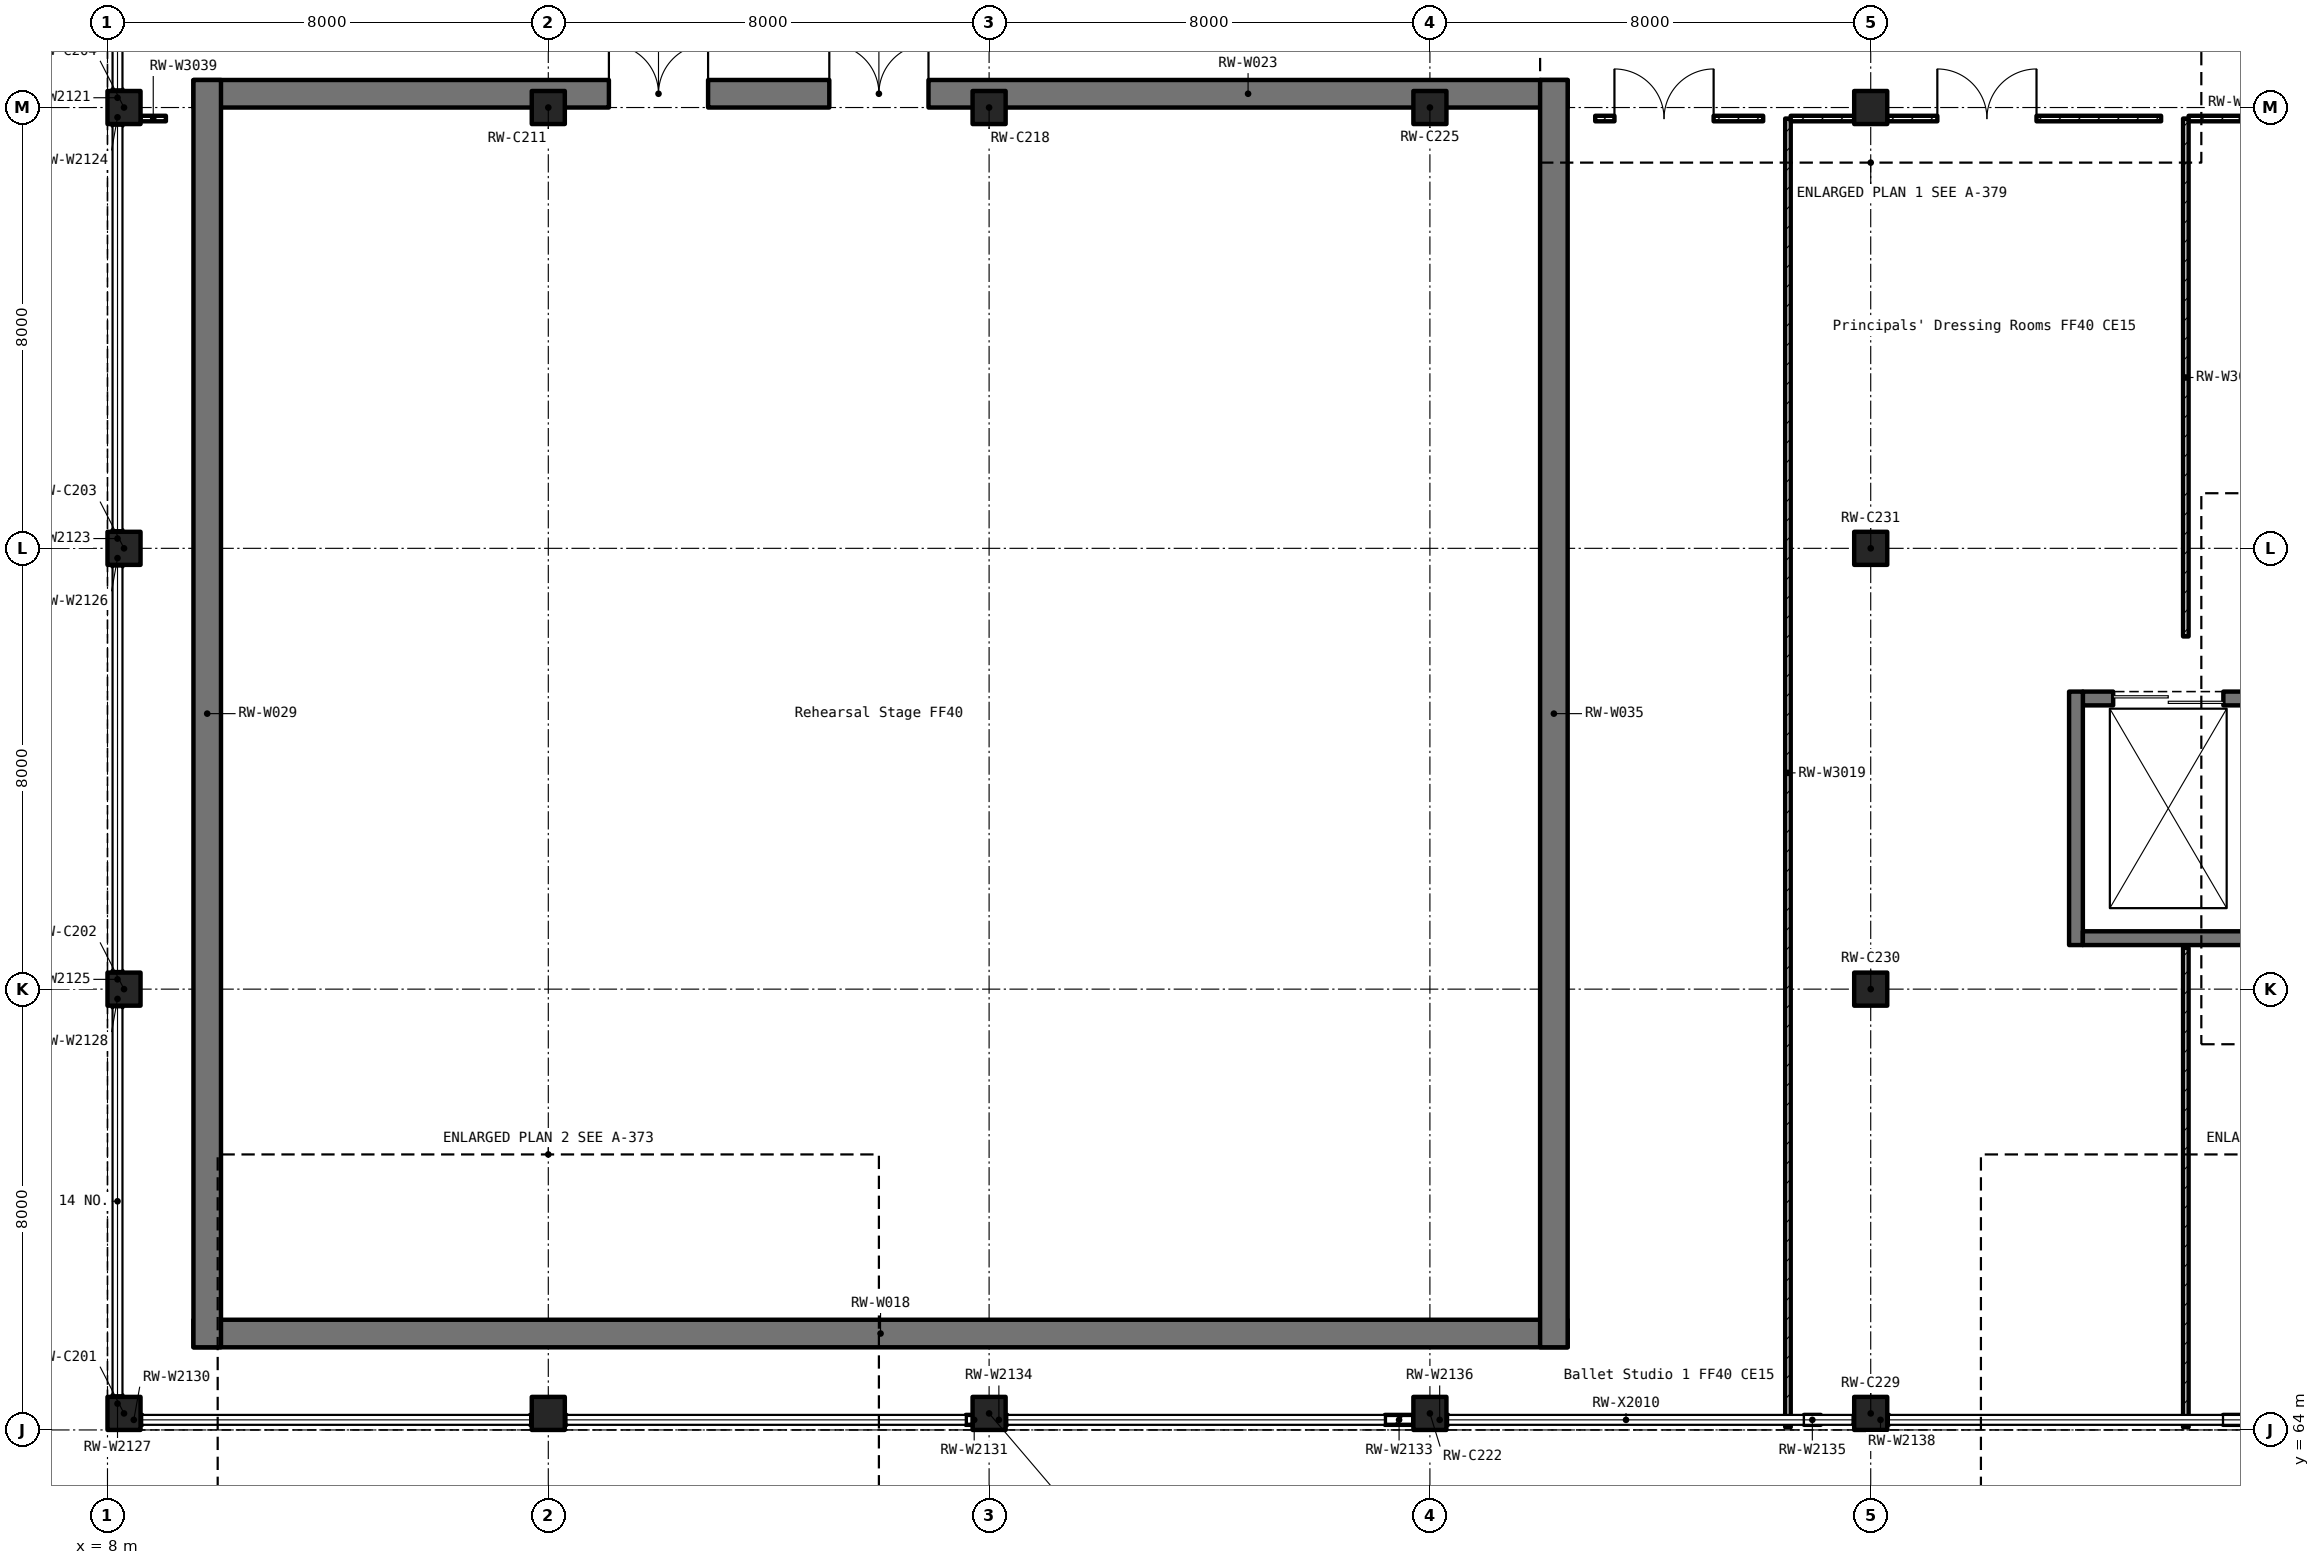
"""IFC4 building model, lengths in metres.
Left out: names, types, materials, properties, quantities, classifications, styles, units other than length and angle.
Written with IfcOpenShell. Run it as: python <this file> out.ifc"""

import sys

from ifc_helpers import new_model, si_unit, direction, frame, frame_2d, origin, origin_2d, place, context, subcontext, project, spatial, rectangle, extrude, element, fill, save


model = new_model("IFC4")
c1 = context("Model", 3, precision=1e-05, world=origin(), true_north=direction((0.0, 1.0)))
c2 = subcontext(c1, "Body", "Model", "MODEL_VIEW")
j1 = project(units=[si_unit("LENGTHUNIT", "METRE"), si_unit("PLANEANGLEUNIT", "RADIAN")], contexts=[c1])
p1 = place(None, origin())
s1 = spatial("IfcSite", under=j1, at=p1, CompositionType="ELEMENT")
p2 = place(p1, origin())
s2 = spatial("IfcBuilding", under=s1, at=p2, CompositionType="ELEMENT")
p3 = place(p2, origin())
s3 = spatial("IfcBuildingStorey", under=s2, at=p3, CompositionType="ELEMENT", Elevation=0.0)
for number, where, z_axis, x_axis in (
    (1, (8.3, 64.3, 0.0), (0.0, 0.0, 1.0), (1.0, 0.0, 0.0)),
    (2, (8.3, 72.0, 0.0), (0.0, 0.0, 1.0), (1.0, 0.0, 0.0)),
    (3, (8.3, 80.0, 0.0), (0.0, 0.0, 1.0), (1.0, 0.0, 0.0)),
    (4, (8.3, 88.0, 0.0), (0.0, 0.0, 1.0), (1.0, 0.0, 0.0)),
    (5, (16.0, 64.3, 0.0), (0.0, 0.0, 1.0), (1.0, 0.0, 0.0)),
    (6, (16.0, 88.0, 0.0), (0.0, 0.0, 1.0), (1.0, 0.0, 0.0)),
    (7, (24.0, 64.3, 0.0), (0.0, 0.0, 1.0), (1.0, 0.0, 0.0)),
    (8, (24.0, 88.0, 0.0), (0.0, 0.0, 1.0), (1.0, 0.0, 0.0)),
    (9, (32.0, 64.3, 0.0), (0.0, 0.0, 1.0), (1.0, 0.0, 0.0)),
    (10, (32.0, 88.0, 0.0), (0.0, 0.0, 1.0), (1.0, 0.0, 0.0)),
    (11, (40.0, 64.3, 0.0), (0.0, 0.0, 1.0), (1.0, 0.0, 0.0)),
    (12, (40.0, 72.0, 0.0), (0.0, 0.0, 1.0), (1.0, 0.0, 0.0)),
    (13, (40.0, 80.0, 0.0), (0.0, 0.0, 1.0), (1.0, 0.0, 0.0)),
    (14, (40.0, 88.0, 0.0), (0.0, 0.0, 1.0), (1.0, 0.0, 0.0)),
):
    element("IfcColumn", number, at=place(p3, frame(where, z_axis=z_axis, x_axis=x_axis)), inside=s3, PredefinedType="COLUMN", context=c2, shape_type="SweptSolid", body=[
        extrude(rectangle(XDim=0.6, YDim=0.6, at=origin_2d()), origin(), (0.0, 0.0, 1.0), 6.0),
    ])
p4 = place(p3, frame((9.56, 65.75, 0.0), z_axis=(0.0, 0.0, 1.0), x_axis=(1.0, 0.0, 0.0)))
e15 = element("IfcWall", 15, at=p4, inside=s3, PredefinedType="SHEAR", context=c2, shape_type="SweptSolid", body=[
    extrude(rectangle(XDim=24.94, YDim=0.5, at=frame_2d((12.47, 0.0))), origin(), (0.0, 0.0, 1.0), 6.0),
])
p5 = place(p3, frame((9.56, 88.25, 0.0), z_axis=(0.0, 0.0, 1.0), x_axis=(1.0, 0.0, 0.0)))
e16 = element("IfcWall", 16, at=p5, inside=s3, PredefinedType="SHEAR", context=c2, shape_type="SweptSolid", body=[
    extrude(rectangle(XDim=24.94, YDim=0.5, at=frame_2d((12.47, 0.0))), origin(), (0.0, 0.0, 1.0), 6.0),
])
p6 = place(p5, frame((11.54, 0.0, 0.0)))
e17 = element("IfcOpeningElement", 17, at=p6, cuts=e16, PredefinedType="OPENING", context=c2, shape_type="SweptSolid", body=[
    extrude(rectangle(XDim=1.8, YDim=2.1, at=frame_2d((0.9, 1.05))), frame((0.0, 0.262, 0.0), z_axis=(0.0, -1.0, 0.0), x_axis=(1.0, 0.0, 0.0)), (0.0, 0.0, 1.0), 0.524),
])
p7 = place(p5, frame((7.54, 0.0, 0.0)))
e18 = element("IfcOpeningElement", 18, at=p7, cuts=e16, PredefinedType="OPENING", context=c2, shape_type="SweptSolid", body=[
    extrude(rectangle(XDim=1.8, YDim=2.1, at=frame_2d((0.9, 1.05))), frame((0.0, 0.262, 0.0), z_axis=(0.0, -1.0, 0.0), x_axis=(1.0, 0.0, 0.0)), (0.0, 0.0, 1.0), 0.524),
])
for number, where, z_axis, x_axis in (
    (19, (9.81, 65.5, 0.0), (0.0, 0.0, 1.0), (0.0, 1.0, 0.0)),
    (20, (34.25, 65.5, 0.0), (0.0, 0.0, 1.0), (0.0, 1.0, 0.0)),
):
    element("IfcWall", number, at=place(p3, frame(where, z_axis=z_axis, x_axis=x_axis)), inside=s3, PredefinedType="SHEAR", context=c2, shape_type="SweptSolid", body=[
        extrude(rectangle(XDim=23.0, YDim=0.5, at=frame_2d((11.5, 0.0))), origin(), (0.0, 0.0, 1.0), 6.0),
    ])
p8 = place(p3, frame((46.95, 77.275, 0.0), z_axis=(0.0, 0.0, 1.0), x_axis=(-1.0, 0.0, 0.0)))
e21 = element("IfcWall", 21, at=p8, inside=s3, PredefinedType="SOLIDWALL", context=c2, shape_type="SweptSolid", body=[
    extrude(rectangle(XDim=3.1, YDim=0.25, at=frame_2d((1.55, 0.0))), origin(), (0.0, 0.0, 1.0), 6.0),
])
p9 = place(p8, frame((0.55, 0.0, 0.0)))
e22 = element("IfcOpeningElement", 22, at=p9, cuts=e21, PredefinedType="OPENING", context=c2, shape_type="SweptSolid", body=[
    extrude(rectangle(XDim=2.0, YDim=2.2, at=frame_2d((1.0, 1.1))), frame((0.0, 0.137, 0.0), z_axis=(0.0, -1.0, 0.0), x_axis=(1.0, 0.0, 0.0)), (0.0, 0.0, 1.0), 0.274),
])
p10 = place(p3, frame((43.725, 77.4, 0.0), z_axis=(0.0, 0.0, 1.0), x_axis=(0.0, -1.0, 0.0)))
e23 = element("IfcWall", 23, at=p10, inside=s3, PredefinedType="SOLIDWALL", context=c2, shape_type="SweptSolid", body=[
    extrude(rectangle(XDim=4.6, YDim=0.25, at=frame_2d((2.3, 0.0))), origin(), (0.0, 0.0, 1.0), 6.0),
])
p11 = place(p3, frame((43.85, 72.925, 0.0), z_axis=(0.0, 0.0, 1.0), x_axis=(1.0, 0.0, 0.0)))
e24 = element("IfcWall", 24, at=p11, inside=s3, PredefinedType="SOLIDWALL", context=c2, shape_type="SweptSolid", body=[
    extrude(rectangle(XDim=3.1, YDim=0.25, at=frame_2d((1.55, 0.0))), origin(), (0.0, 0.0, 1.0), 6.0),
])
p12 = place(p3, frame((38.498, 87.8, 0.0), z_axis=(0.0, 0.0, 1.0), x_axis=(0.0, -1.0, 0.0)))
e25 = element("IfcWall", 25, at=p12, inside=s3, PredefinedType="PARTITIONING", context=c2, shape_type="SweptSolid", body=[
    extrude(rectangle(XDim=23.75, YDim=0.1, at=frame_2d((11.875, 0.0))), origin(), (0.0, 0.0, 1.0), 4.95),
])
p13 = place(p3, frame((45.719, 87.8, 0.0), z_axis=(0.0, 0.0, 1.0), x_axis=(0.0, -1.0, 0.0)))
e26 = element("IfcWall", 26, at=p13, inside=s3, PredefinedType="PARTITIONING", context=c2, shape_type="SweptSolid", body=[
    extrude(rectangle(XDim=9.399, YDim=0.1, at=frame_2d((4.7, 0.0))), origin(), (0.0, 0.0, 1.0), 4.95),
])
p14 = place(p3, frame((45.719, 72.75, 0.0), z_axis=(0.0, 0.0, 1.0), x_axis=(0.0, -1.0, 0.0)))
e27 = element("IfcWall", 27, at=p14, inside=s3, PredefinedType="PARTITIONING", context=c2, shape_type="SweptSolid", body=[
    extrude(rectangle(XDim=8.7, YDim=0.1, at=frame_2d((4.35, 0.0))), origin(), (0.0, 0.0, 1.0), 4.95),
])
p15 = place(p3, frame((45.77, 87.8, 0.0), z_axis=(0.0, 0.0, 1.0), x_axis=(1.0, 0.0, 0.0)))
e28 = element("IfcWall", 28, at=p15, inside=s3, PredefinedType="PARTITIONING", context=c2, shape_type="SweptSolid", body=[
    extrude(rectangle(XDim=1.93, YDim=0.1, at=frame_2d((0.965, 0.0))), origin(), (0.0, 0.0, 1.0), 4.95),
])
p16 = place(p3, frame((38.548, 87.8, 0.0), z_axis=(0.0, 0.0, 1.0), x_axis=(1.0, 0.0, 0.0)))
e29 = element("IfcWall", 29, at=p16, inside=s3, PredefinedType="PARTITIONING", context=c2, shape_type="SweptSolid", body=[
    extrude(rectangle(XDim=1.152, YDim=0.1, at=frame_2d((0.576, 0.0))), origin(), (0.0, 0.0, 1.0), 4.95),
])
p17 = place(p3, frame((40.3, 87.8, 0.0), z_axis=(0.0, 0.0, 1.0), x_axis=(1.0, 0.0, 0.0)))
e30 = element("IfcWall", 30, at=p17, inside=s3, PredefinedType="PARTITIONING", context=c2, shape_type="SweptSolid", body=[
    extrude(rectangle(XDim=4.97, YDim=0.1, at=frame_2d((2.485, 0.0))), origin(), (0.0, 0.0, 1.0), 4.95),
])
p18 = place(p17, frame((0.909, 0.0, 0.0)))
e31 = element("IfcOpeningElement", 31, at=p18, cuts=e30, PredefinedType="OPENING", context=c2, shape_type="SweptSolid", body=[
    extrude(rectangle(XDim=1.8, YDim=2.1, at=frame_2d((0.9, 1.05))), frame((0.0, 0.062, 0.0), z_axis=(0.0, -1.0, 0.0), x_axis=(1.0, 0.0, 0.0)), (0.0, 0.0, 1.0), 0.124),
])
p19 = place(p3, frame((35.0, 87.8, 0.0), z_axis=(0.0, 0.0, 1.0), x_axis=(1.0, 0.0, 0.0)))
e32 = element("IfcWall", 32, at=p19, inside=s3, PredefinedType="PARTITIONING", context=c2, shape_type="SweptSolid", body=[
    extrude(rectangle(XDim=3.048, YDim=0.1, at=frame_2d((1.524, 0.0))), origin(), (0.0, 0.0, 1.0), 4.95),
])
p20 = place(p19, frame((0.349, 0.0, 0.0)))
e33 = element("IfcOpeningElement", 33, at=p20, cuts=e32, PredefinedType="OPENING", context=c2, shape_type="SweptSolid", body=[
    extrude(rectangle(XDim=1.8, YDim=2.1, at=frame_2d((0.9, 1.05))), frame((0.0, 0.062, 0.0), z_axis=(0.0, -1.0, 0.0), x_axis=(1.0, 0.0, 0.0)), (0.0, 0.0, 1.0), 0.124),
])
p21 = place(p3, frame((8.601, 87.8, 0.0), z_axis=(0.0, 0.0, 1.0), x_axis=(1.0, 0.0, 0.0)))
e34 = element("IfcWall", 34, at=p21, inside=s3, PredefinedType="PARTITIONING", context=c2, shape_type="SweptSolid", body=[
    extrude(rectangle(XDim=0.459, YDim=0.1, at=frame_2d((0.229, 0.0))), origin(), (0.0, 0.0, 1.0), 4.95),
])
for number, where, z_axis, x_axis in (
    (35, (8.182, 88.33, 0.0), (0.0, 0.0, 1.0), (0.0, -1.0, 0.0)),
    (36, (8.182, 80.33, 0.0), (0.0, 0.0, 1.0), (0.0, -1.0, 0.0)),
    (37, (8.182, 87.67, 0.0), (0.0, 0.0, 1.0), (0.0, 1.0, 0.0)),
    (38, (8.182, 72.33, 0.0), (0.0, 0.0, 1.0), (0.0, -1.0, 0.0)),
    (39, (8.182, 79.67, 0.0), (0.0, 0.0, 1.0), (0.0, 1.0, 0.0)),
):
    element("IfcWall", number, at=place(p3, frame(where, z_axis=z_axis, x_axis=x_axis)), inside=s3, PredefinedType="SOLIDWALL", context=c2, shape_type="SweptSolid", body=[
        extrude(rectangle(XDim=0.305, YDim=0.18, at=frame_2d((0.153, 0.0))), origin(), (0.0, 0.0, 1.0), 4.2),
    ])
p22 = place(p3, frame((8.182, 64.63, 0.0), z_axis=(0.0, 0.0, 1.0), x_axis=(0.0, -1.0, 0.0)))
e40 = element("IfcWall", 40, at=p22, inside=s3, PredefinedType="SOLIDWALL", context=c2, shape_type="SweptSolid", body=[
    extrude(rectangle(XDim=0.305, YDim=0.18, at=frame_2d((0.152, 0.0))), origin(), (0.0, 0.0, 1.0), 4.2),
])
for number, where, z_axis, x_axis in (
    (41, (8.182, 71.67, 0.0), (0.0, 0.0, 1.0), (0.0, 1.0, 0.0)),
    (42, (15.67, 64.183, 0.0), (0.0, 0.0, 1.0), (1.0, 0.0, 0.0)),
):
    element("IfcWall", number, at=place(p3, frame(where, z_axis=z_axis, x_axis=x_axis)), inside=s3, PredefinedType="SOLIDWALL", context=c2, shape_type="SweptSolid", body=[
        extrude(rectangle(XDim=0.305, YDim=0.18, at=frame_2d((0.153, 0.0))), origin(), (0.0, 0.0, 1.0), 4.2),
    ])
p23 = place(p3, frame((8.63, 64.183, 0.0), z_axis=(0.0, 0.0, 1.0), x_axis=(-1.0, 0.0, 0.0)))
e43 = element("IfcWall", 43, at=p23, inside=s3, PredefinedType="SOLIDWALL", context=c2, shape_type="SweptSolid", body=[
    extrude(rectangle(XDim=0.305, YDim=0.18, at=frame_2d((0.152, 0.0))), origin(), (0.0, 0.0, 1.0), 4.2),
])
for number, where, z_axis, x_axis in (
    (44, (23.577, 64.183, 0.0), (0.0, 0.0, 1.0), (1.0, 0.0, 0.0)),
    (45, (16.33, 64.183, 0.0), (0.0, 0.0, 1.0), (-1.0, 0.0, 0.0)),
):
    element("IfcWall", number, at=place(p3, frame(where, z_axis=z_axis, x_axis=x_axis)), inside=s3, PredefinedType="SOLIDWALL", context=c2, shape_type="SweptSolid", body=[
        extrude(rectangle(XDim=0.305, YDim=0.18, at=frame_2d((0.153, 0.0))), origin(), (0.0, 0.0, 1.0), 4.2),
    ])
p24 = place(p3, frame((31.183, 64.183, 0.0), z_axis=(0.0, 0.0, 1.0), x_axis=(1.0, 0.0, 0.0)))
e46 = element("IfcWall", 46, at=p24, inside=s3, PredefinedType="SOLIDWALL", context=c2, shape_type="SweptSolid", body=[
    extrude(rectangle(XDim=0.515, YDim=0.18, at=frame_2d((0.257, 0.0))), origin(), (0.0, 0.0, 1.0), 4.2),
])
p25 = place(p3, frame((24.33, 64.183, 0.0), z_axis=(0.0, 0.0, 1.0), x_axis=(-1.0, 0.0, 0.0)))
e47 = element("IfcWall", 47, at=p25, inside=s3, PredefinedType="SOLIDWALL", context=c2, shape_type="SweptSolid", body=[
    extrude(rectangle(XDim=0.305, YDim=0.18, at=frame_2d((0.153, 0.0))), origin(), (0.0, 0.0, 1.0), 4.2),
])
p26 = place(p3, frame((38.788, 64.183, 0.0), z_axis=(0.0, 0.0, 1.0), x_axis=(1.0, 0.0, 0.0)))
e48 = element("IfcWall", 48, at=p26, inside=s3, PredefinedType="SOLIDWALL", context=c2, shape_type="SweptSolid", body=[
    extrude(rectangle(XDim=0.305, YDim=0.18, at=frame_2d((0.152, 0.0))), origin(), (0.0, 0.0, 1.0), 4.2),
])
p27 = place(p3, frame((32.33, 64.183, 0.0), z_axis=(0.0, 0.0, 1.0), x_axis=(-1.0, 0.0, 0.0)))
e49 = element("IfcWall", 49, at=p27, inside=s3, PredefinedType="SOLIDWALL", context=c2, shape_type="SweptSolid", body=[
    extrude(rectangle(XDim=0.305, YDim=0.18, at=frame_2d((0.153, 0.0))), origin(), (0.0, 0.0, 1.0), 4.2),
])
p28 = place(p3, frame((46.394, 64.183, 0.0), z_axis=(0.0, 0.0, 1.0), x_axis=(1.0, 0.0, 0.0)))
e50 = element("IfcWall", 50, at=p28, inside=s3, PredefinedType="SOLIDWALL", context=c2, shape_type="SweptSolid", body=[
    extrude(rectangle(XDim=0.305, YDim=0.18, at=frame_2d((0.152, 0.0))), origin(), (0.0, 0.0, 1.0), 4.2),
])
p29 = place(p3, frame((40.33, 64.183, 0.0), z_axis=(0.0, 0.0, 1.0), x_axis=(-1.0, 0.0, 0.0)))
e51 = element("IfcWall", 51, at=p29, inside=s3, PredefinedType="SOLIDWALL", context=c2, shape_type="SweptSolid", body=[
    extrude(rectangle(XDim=0.305, YDim=0.18, at=frame_2d((0.153, 0.0))), origin(), (0.0, 0.0, 1.0), 4.2),
])
p30 = place(p9, origin())
e52 = element("IfcDoor", 52, at=p30, inside=s3, OperationType="DOUBLE_DOOR_SLIDING", PredefinedType="DOOR", context=c2, shape_type="SweptSolid", body=[
    extrude(rectangle(XDim=2.0, YDim=2.2, at=frame_2d((1.0, 1.1))), frame((0.0, 0.025, 0.0), z_axis=(0.0, -1.0, 0.0), x_axis=(1.0, 0.0, 0.0)), (0.0, 0.0, 1.0), 0.05),
])
fill(e22, e52)
p31 = place(p6, origin())
e53 = element("IfcDoor", 53, at=p31, inside=s3, OperationType="DOUBLE_DOOR_SINGLE_SWING", PredefinedType="DOOR", context=c2, shape_type="SweptSolid", body=[
    extrude(rectangle(XDim=1.8, YDim=2.1, at=frame_2d((0.9, 1.05))), frame((0.0, 0.025, 0.0), z_axis=(0.0, -1.0, 0.0), x_axis=(1.0, 0.0, 0.0)), (0.0, 0.0, 1.0), 0.05),
])
fill(e17, e53)
p32 = place(p7, origin())
e54 = element("IfcDoor", 54, at=p32, inside=s3, OperationType="DOUBLE_DOOR_SINGLE_SWING", PredefinedType="DOOR", context=c2, shape_type="SweptSolid", body=[
    extrude(rectangle(XDim=1.8, YDim=2.1, at=frame_2d((0.9, 1.05))), frame((0.0, 0.025, 0.0), z_axis=(0.0, -1.0, 0.0), x_axis=(1.0, 0.0, 0.0)), (0.0, 0.0, 1.0), 0.05),
])
fill(e18, e54)
p33 = place(p20, origin())
e55 = element("IfcDoor", 55, at=p33, inside=s3, OperationType="DOUBLE_DOOR_SINGLE_SWING", PredefinedType="DOOR", context=c2, shape_type="SweptSolid", body=[
    extrude(rectangle(XDim=1.8, YDim=2.1, at=frame_2d((0.9, 1.05))), frame((0.0, 0.025, 0.0), z_axis=(0.0, -1.0, 0.0), x_axis=(1.0, 0.0, 0.0)), (0.0, 0.0, 1.0), 0.05),
])
fill(e33, e55)
p34 = place(p18, origin())
e56 = element("IfcDoor", 56, at=p34, inside=s3, OperationType="DOUBLE_DOOR_SINGLE_SWING", PredefinedType="DOOR", context=c2, shape_type="SweptSolid", body=[
    extrude(rectangle(XDim=1.8, YDim=2.1, at=frame_2d((0.9, 1.05))), frame((0.0, 0.025, 0.0), z_axis=(0.0, -1.0, 0.0), x_axis=(1.0, 0.0, 0.0)), (0.0, 0.0, 1.0), 0.05),
])
fill(e31, e56)
save(model, sys.argv[1])
